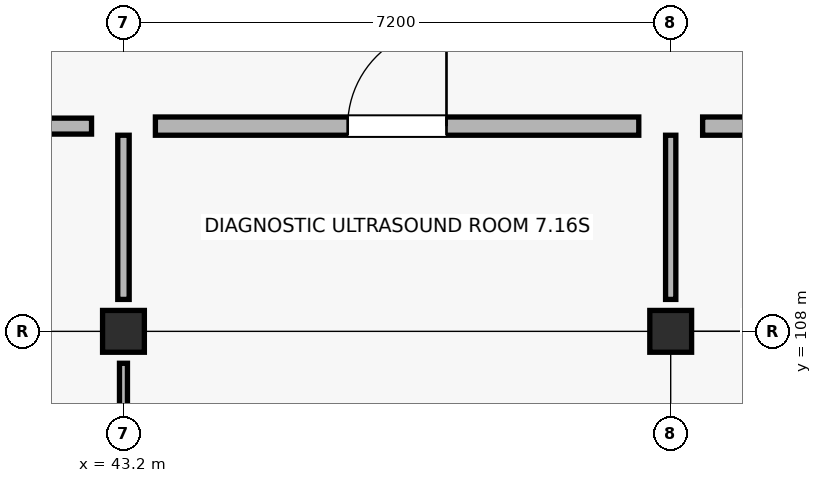
"""IFC4 building model, lengths in metres.
Left out: names, types, materials, properties, quantities, classifications, styles, units other than length and angle.
Written with IfcOpenShell. Run it as: python <this file> out.ifc"""

import sys

from ifc_helpers import new_model, si_unit, direction, frame, frame_2d, origin, origin_2d, place, context, subcontext, project, spatial, rectangle, extrude, element, fill, save


model = new_model("IFC4")
c1 = context("Model", 3, precision=1e-05, world=origin(), true_north=direction((0.0, 1.0)))
c2 = subcontext(c1, "Body", "Model", "MODEL_VIEW")
j1 = project(units=[si_unit("LENGTHUNIT", "METRE"), si_unit("PLANEANGLEUNIT", "RADIAN")], contexts=[c1])
p1 = place(None, origin())
s1 = spatial("IfcSite", under=j1, at=p1, CompositionType="ELEMENT")
p2 = place(p1, origin())
s2 = spatial("IfcBuilding", under=s1, at=p2, CompositionType="ELEMENT")
p3 = place(p2, frame((0.0, 0.0, 4.5)))
s3 = spatial("IfcBuildingStorey", under=s2, at=p3, CompositionType="ELEMENT", Elevation=4.5)
for number, where, z_axis, x_axis in (
    (1, (43.2, 108.0, 0.0), (0.0, 0.0, 1.0), (1.0, 0.0, 0.0)),
    (2, (50.4, 108.0, 0.0), (0.0, 0.0, 1.0), (1.0, 0.0, 0.0)),
):
    element("IfcColumn", number, at=place(p3, frame(where, z_axis=z_axis, x_axis=x_axis)), inside=s3, PredefinedType="COLUMN", context=c2, shape_type="SweptSolid", body=[
        extrude(rectangle(XDim=0.55, YDim=0.55, at=origin_2d()), origin(), (0.0, 0.0, 1.0), 4.5),
    ])
p4 = place(p3, frame((43.2, 105.54, 0.0), z_axis=(0.0, 0.0, 1.0), x_axis=(0.0, 1.0, 0.0)))
e3 = element("IfcWall", 3, at=p4, inside=s3, PredefinedType="PARTITIONING", context=c2, shape_type="SweptSolid", body=[
    extrude(rectangle(XDim=2.04, YDim=0.105, at=frame_2d((1.02, 0.0))), origin(), (0.0, 0.0, 1.0), 3.36),
])
p5 = place(p3, frame((36.42, 110.7, 0.0), z_axis=(0.0, 0.0, 1.0), x_axis=(1.0, 0.0, 0.0)))
e4 = element("IfcWall", 4, at=p5, inside=s3, PredefinedType="PLUMBINGWALL", context=c2, shape_type="SweptSolid", body=[
    extrude(rectangle(XDim=6.36, YDim=0.21, at=frame_2d((3.18, 0.0))), origin(), (0.0, 0.0, 1.0), 3.36),
])
p6 = place(p5, frame((2.555, 0.0, 0.0)))
e5 = element("IfcOpeningElement", 5, at=p6, cuts=e4, PredefinedType="OPENING", context=c2, shape_type="SweptSolid", body=[
    extrude(rectangle(XDim=1.25, YDim=2.15, at=frame_2d((0.625, 1.075))), frame((0.0, 0.115, 0.0), z_axis=(0.0, -1.0, 0.0), x_axis=(1.0, 0.0, 0.0)), (0.0, 0.0, 1.0), 0.23),
])
p7 = place(p3, frame((43.2, 108.42, 0.0), z_axis=(0.0, 0.0, 1.0), x_axis=(0.0, 1.0, 0.0)))
e6 = element("IfcWall", 6, at=p7, inside=s3, PredefinedType="PARTITIONING", context=c2, shape_type="SweptSolid", body=[
    extrude(rectangle(XDim=2.16, YDim=0.15, at=frame_2d((1.08, 0.0))), origin(), (0.0, 0.0, 1.0), 3.36),
])
p8 = place(p3, frame((43.62, 110.7, 0.0), z_axis=(0.0, 0.0, 1.0), x_axis=(1.0, 0.0, 0.0)))
e7 = element("IfcWall", 7, at=p8, inside=s3, PredefinedType="SOLIDWALL", context=c2, shape_type="SweptSolid", body=[
    extrude(rectangle(XDim=6.36, YDim=0.24, at=frame_2d((3.18, 0.0))), origin(), (0.0, 0.0, 1.0), 3.36),
])
p9 = place(p8, frame((2.53, 0.0, 0.0)))
e8 = element("IfcOpeningElement", 8, at=p9, cuts=e7, PredefinedType="OPENING", context=c2, shape_type="SweptSolid", body=[
    extrude(rectangle(XDim=1.3, YDim=2.15, at=frame_2d((0.65, 1.075))), frame((0.0, 0.13, 0.0), z_axis=(0.0, -1.0, 0.0), x_axis=(1.0, 0.0, 0.0)), (0.0, 0.0, 1.0), 0.26),
])
p10 = place(p3, frame((50.4, 108.42, 0.0), z_axis=(0.0, 0.0, 1.0), x_axis=(0.0, 1.0, 0.0)))
e9 = element("IfcWall", 9, at=p10, inside=s3, PredefinedType="PARTITIONING", context=c2, shape_type="SweptSolid", body=[
    extrude(rectangle(XDim=2.16, YDim=0.135, at=frame_2d((1.08, 0.0))), origin(), (0.0, 0.0, 1.0), 3.36),
])
p11 = place(p3, frame((50.82, 110.7, 0.0), z_axis=(0.0, 0.0, 1.0), x_axis=(1.0, 0.0, 0.0)))
e10 = element("IfcWall", 10, at=p11, inside=s3, PredefinedType="SOLIDWALL", context=c2, shape_type="SweptSolid", body=[
    extrude(rectangle(XDim=6.36, YDim=0.24, at=frame_2d((3.18, 0.0))), origin(), (0.0, 0.0, 1.0), 3.36),
])
p12 = place(p11, frame((2.53, 0.0, 0.0)))
e11 = element("IfcOpeningElement", 11, at=p12, cuts=e10, PredefinedType="OPENING", context=c2, shape_type="SweptSolid", body=[
    extrude(rectangle(XDim=1.3, YDim=2.15, at=frame_2d((0.65, 1.075))), frame((0.0, 0.13, 0.0), z_axis=(0.0, -1.0, 0.0), x_axis=(1.0, 0.0, 0.0)), (0.0, 0.0, 1.0), 0.26),
])
p13 = place(p9, origin())
e12 = element("IfcDoor", 12, at=p13, inside=s3, OperationType="SINGLE_SWING_RIGHT", PredefinedType="DOOR", context=c2, shape_type="SweptSolid", body=[
    extrude(rectangle(XDim=1.3, YDim=2.15, at=frame_2d((0.65, 1.075))), frame((0.0, 0.025, 0.0), z_axis=(0.0, -1.0, 0.0), x_axis=(1.0, 0.0, 0.0)), (0.0, 0.0, 1.0), 0.05),
])
fill(e8, e12)
save(model, sys.argv[1])
